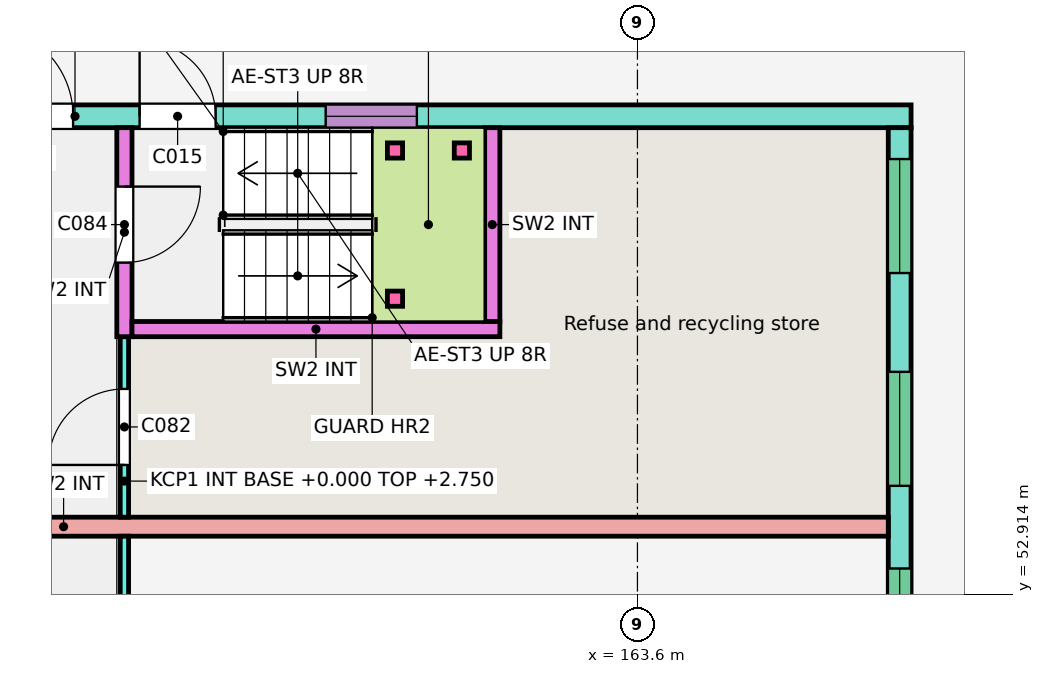
"""IFC4 building model, lengths in metres.
Left out: names, types, materials, properties, quantities, classifications, styles, units other than length and angle.
Written with IfcOpenShell. Run it as: python <this file> out.ifc"""

import sys

from ifc_helpers import new_model, si_unit, direction, frame, frame_2d, origin, origin_2d, place, context, subcontext, project, spatial, rectangle, extrude, element, fill, save


model = new_model("IFC4")
c1 = context("Model", 3, precision=1e-05, world=origin(), true_north=direction((0.0, 1.0)))
c2 = subcontext(c1, "Body", "Model", "MODEL_VIEW")
j1 = project(units=[si_unit("LENGTHUNIT", "METRE"), si_unit("PLANEANGLEUNIT", "RADIAN")], contexts=[c1])
p1 = place(None, origin())
s1 = spatial("IfcSite", under=j1, at=p1, CompositionType="ELEMENT")
p2 = place(p1, origin())
s2 = spatial("IfcBuilding", under=s1, at=p2, CompositionType="ELEMENT")
p3 = place(p2, origin())
s3 = spatial("IfcBuildingStorey", under=s2, at=p3, CompositionType="ELEMENT", Elevation=0.0)
p4 = place(p3, frame((145.2, 59.2, -0.25), z_axis=(0.0, 0.0, 1.0), x_axis=(1.0, 0.0, 0.0)))
e1 = element("IfcWall", 1, at=p4, inside=s3, PredefinedType="SOLIDWALL", context=c2, shape_type="SweptSolid", body=[
    extrude(rectangle(XDim=22.0, YDim=0.3, at=frame_2d((11.0, 0.0))), origin(), (0.0, 0.0, 1.0), 3.25),
])
p5 = place(p4, frame((14.298, 0.0, 1.15)))
e2 = element("IfcOpeningElement", 2, at=p5, cuts=e1, PredefinedType="OPENING", context=c2, shape_type="SweptSolid", body=[
    extrude(rectangle(XDim=1.2, YDim=1.5, at=frame_2d((0.6, 0.75))), frame((0.0, 0.16, 0.0), z_axis=(0.0, -1.0, 0.0), x_axis=(1.0, 0.0, 0.0)), (0.0, 0.0, 1.0), 0.32),
])
p6 = place(p4, frame((9.775, 0.0, 0.25)))
e3 = element("IfcOpeningElement", 3, at=p6, cuts=e1, PredefinedType="OPENING", context=c2, shape_type="SweptSolid", body=[
    extrude(rectangle(XDim=1.2, YDim=2.1, at=frame_2d((0.6, 1.05))), frame((0.0, 0.16, 0.0), z_axis=(0.0, -1.0, 0.0), x_axis=(1.0, 0.0, 0.0)), (0.0, 0.0, 1.0), 0.32),
])
p7 = place(p4, frame((11.85, 0.0, 0.25)))
e4 = element("IfcOpeningElement", 4, at=p7, cuts=e1, PredefinedType="OPENING", context=c2, shape_type="SweptSolid", body=[
    extrude(rectangle(XDim=1.0, YDim=2.1, at=frame_2d((0.5, 1.05))), frame((0.0, 0.16, 0.0), z_axis=(0.0, -1.0, 0.0), x_axis=(1.0, 0.0, 0.0)), (0.0, 0.0, 1.0), 0.32),
])
p8 = place(p3, frame((167.05, 37.75, -0.25), z_axis=(0.0, 0.0, 1.0), x_axis=(0.0, 1.0, 0.0)))
e5 = element("IfcWall", 5, at=p8, inside=s3, PredefinedType="SOLIDWALL", context=c2, shape_type="SweptSolid", body=[
    extrude(rectangle(XDim=21.3, YDim=0.3, at=frame_2d((10.65, 0.0))), origin(), (0.0, 0.0, 1.0), 3.25),
])
p9 = place(p8, frame((0.413, 0.0, 1.15)))
e6 = element("IfcOpeningElement", 6, at=p9, cuts=e5, PredefinedType="OPENING", context=c2, shape_type="SweptSolid", body=[
    extrude(rectangle(XDim=1.5, YDim=1.4, at=frame_2d((0.75, 0.7))), frame((0.0, 0.16, 0.0), z_axis=(0.0, -1.0, 0.0), x_axis=(1.0, 0.0, 0.0)), (0.0, 0.0, 1.0), 0.32),
])
p10 = place(p8, frame((3.212, 0.0, 1.15)))
e7 = element("IfcOpeningElement", 7, at=p10, cuts=e5, PredefinedType="OPENING", context=c2, shape_type="SweptSolid", body=[
    extrude(rectangle(XDim=1.5, YDim=1.4, at=frame_2d((0.75, 0.7))), frame((0.0, 0.16, 0.0), z_axis=(0.0, -1.0, 0.0), x_axis=(1.0, 0.0, 0.0)), (0.0, 0.0, 1.0), 0.32),
])
p11 = place(p8, frame((5.8, 0.0, 1.15)))
e8 = element("IfcOpeningElement", 8, at=p11, cuts=e5, PredefinedType="OPENING", context=c2, shape_type="SweptSolid", body=[
    extrude(rectangle(XDim=1.5, YDim=1.4, at=frame_2d((0.75, 0.7))), frame((0.0, 0.16, 0.0), z_axis=(0.0, -1.0, 0.0), x_axis=(1.0, 0.0, 0.0)), (0.0, 0.0, 1.0), 0.32),
])
p12 = place(p8, frame((8.6, 0.0, 1.15)))
e9 = element("IfcOpeningElement", 9, at=p12, cuts=e5, PredefinedType="OPENING", context=c2, shape_type="SweptSolid", body=[
    extrude(rectangle(XDim=1.5, YDim=1.4, at=frame_2d((0.75, 0.7))), frame((0.0, 0.16, 0.0), z_axis=(0.0, -1.0, 0.0), x_axis=(1.0, 0.0, 0.0)), (0.0, 0.0, 1.0), 0.32),
])
p13 = place(p8, frame((11.2, 0.0, 1.15)))
e10 = element("IfcOpeningElement", 10, at=p13, cuts=e5, PredefinedType="OPENING", context=c2, shape_type="SweptSolid", body=[
    extrude(rectangle(XDim=1.5, YDim=1.4, at=frame_2d((0.75, 0.7))), frame((0.0, 0.16, 0.0), z_axis=(0.0, -1.0, 0.0), x_axis=(1.0, 0.0, 0.0)), (0.0, 0.0, 1.0), 0.32),
])
p14 = place(p8, frame((14.0, 0.0, 1.15)))
e11 = element("IfcOpeningElement", 11, at=p14, cuts=e5, PredefinedType="OPENING", context=c2, shape_type="SweptSolid", body=[
    extrude(rectangle(XDim=1.5, YDim=1.4, at=frame_2d((0.75, 0.7))), frame((0.0, 0.16, 0.0), z_axis=(0.0, -1.0, 0.0), x_axis=(1.0, 0.0, 0.0)), (0.0, 0.0, 1.0), 0.32),
])
p15 = place(p8, frame((16.587, 0.0, 1.15)))
e12 = element("IfcOpeningElement", 12, at=p15, cuts=e5, PredefinedType="OPENING", context=c2, shape_type="SweptSolid", body=[
    extrude(rectangle(XDim=1.5, YDim=1.4, at=frame_2d((0.75, 0.7))), frame((0.0, 0.16, 0.0), z_axis=(0.0, -1.0, 0.0), x_axis=(1.0, 0.0, 0.0)), (0.0, 0.0, 1.0), 0.32),
])
p16 = place(p8, frame((19.387, 0.0, 1.15)))
e13 = element("IfcOpeningElement", 13, at=p16, cuts=e5, PredefinedType="OPENING", context=c2, shape_type="SweptSolid", body=[
    extrude(rectangle(XDim=1.5, YDim=1.4, at=frame_2d((0.75, 0.7))), frame((0.0, 0.16, 0.0), z_axis=(0.0, -1.0, 0.0), x_axis=(1.0, 0.0, 0.0)), (0.0, 0.0, 1.0), 0.32),
])
p17 = place(p3, frame((145.2, 53.8, -0.25), z_axis=(0.0, 0.0, 1.0), x_axis=(1.0, 0.0, 0.0)))
e14 = element("IfcWall", 14, at=p17, inside=s3, PredefinedType="SOLIDWALL", context=c2, shape_type="SweptSolid", body=[
    extrude(rectangle(XDim=21.7, YDim=0.25, at=frame_2d((10.85, 0.0))), origin(), (0.0, 0.0, 1.0), 3.25),
])
for number, where, z_axis, x_axis in (
    (15, (160.41, 56.8, 0.0), (0.0, 0.0, 1.0), (1.0, 0.0, 0.0)),
    (16, (160.41, 58.75, 0.0), (0.0, 0.0, 1.0), (1.0, 0.0, 0.0)),
    (17, (161.29, 58.75, 0.0), (0.0, 0.0, 1.0), (1.0, 0.0, 0.0)),
):
    element("IfcColumn", number, at=place(p3, frame(where, z_axis=z_axis, x_axis=x_axis)), inside=s3, PredefinedType="COLUMN", context=c2, shape_type="SweptSolid", body=[
        extrude(rectangle(XDim=0.2, YDim=0.2, at=origin_2d()), origin(), (0.0, 0.0, 1.0), 1.3),
    ])
p18 = place(p3, frame((156.85, 48.525, 0.0), z_axis=(0.0, 0.0, 1.0), x_axis=(0.0, 1.0, 0.0)))
e18 = element("IfcWall", 18, at=p18, inside=s3, PredefinedType="PARTITIONING", context=c2, shape_type="SweptSolid", body=[
    extrude(rectangle(XDim=5.15, YDim=0.11, at=frame_2d((2.575, 0.0))), origin(), (0.0, 0.0, 1.0), 2.75),
])
p19 = place(p18, frame((2.075, 0.0, 0.0)))
e19 = element("IfcOpeningElement", 19, at=p19, cuts=e18, PredefinedType="OPENING", context=c2, shape_type="SweptSolid", body=[
    extrude(rectangle(XDim=1.0, YDim=2.1, at=frame_2d((0.5, 1.05))), frame((0.0, 0.065, 0.0), z_axis=(0.0, -1.0, 0.0), x_axis=(1.0, 0.0, 0.0)), (0.0, 0.0, 1.0), 0.13),
])
p20 = place(p3, frame((156.85, 53.925, 0.0), z_axis=(0.0, 0.0, 1.0), x_axis=(0.0, 1.0, 0.0)))
e20 = element("IfcWall", 20, at=p20, inside=s3, PredefinedType="PARTITIONING", context=c2, shape_type="SweptSolid", body=[
    extrude(rectangle(XDim=2.375, YDim=0.11, at=frame_2d((1.188, 0.0))), origin(), (0.0, 0.0, 1.0), 2.75),
])
p21 = place(p20, frame((0.688, 0.0, 0.0)))
e21 = element("IfcOpeningElement", 21, at=p21, cuts=e20, PredefinedType="OPENING", context=c2, shape_type="SweptSolid", body=[
    extrude(rectangle(XDim=1.0, YDim=2.1, at=frame_2d((0.5, 1.05))), frame((0.0, 0.065, 0.0), z_axis=(0.0, -1.0, 0.0), x_axis=(1.0, 0.0, 0.0)), (0.0, 0.0, 1.0), 0.13),
])
p22 = place(p3, frame((156.85, 56.3, 0.0), z_axis=(0.0, 0.0, 1.0), x_axis=(0.0, 1.0, 0.0)))
e22 = element("IfcWall", 22, at=p22, inside=s3, PredefinedType="SOLIDWALL", context=c2, shape_type="SweptSolid", body=[
    extrude(rectangle(XDim=2.75, YDim=0.2, at=frame_2d((1.375, 0.0))), origin(), (0.0, 0.0, 1.0), 2.75),
])
p23 = place(p22, frame((0.975, 0.0, 0.0)))
e23 = element("IfcOpeningElement", 23, at=p23, cuts=e22, PredefinedType="OPENING", context=c2, shape_type="SweptSolid", body=[
    extrude(rectangle(XDim=1.0, YDim=2.1, at=frame_2d((0.5, 1.05))), frame((0.0, 0.11, 0.0), z_axis=(0.0, -1.0, 0.0), x_axis=(1.0, 0.0, 0.0)), (0.0, 0.0, 1.0), 0.22),
])
p24 = place(p3, frame((156.95, 56.4, 0.0), z_axis=(0.0, 0.0, 1.0), x_axis=(1.0, 0.0, 0.0)))
e24 = element("IfcWall", 24, at=p24, inside=s3, PredefinedType="SOLIDWALL", context=c2, shape_type="SweptSolid", body=[
    extrude(rectangle(XDim=4.84, YDim=0.2, at=frame_2d((2.42, 0.0))), origin(), (0.0, 0.0, 1.0), 2.75),
])
p25 = place(p3, frame((161.69, 59.05, 0.0), z_axis=(0.0, 0.0, 1.0), x_axis=(0.0, -1.0, 0.0)))
e25 = element("IfcWall", 25, at=p25, inside=s3, PredefinedType="SOLIDWALL", context=c2, shape_type="SweptSolid", body=[
    extrude(rectangle(XDim=2.55, YDim=0.2, at=frame_2d((1.275, 0.0))), origin(), (0.0, 0.0, 1.0), 2.75),
])
p26 = place(p14, origin())
e26 = element("IfcWindow", 26, at=p26, inside=s3, PartitioningType="SINGLE_PANEL", PredefinedType="WINDOW", context=c2, shape_type="SweptSolid", body=[
    extrude(rectangle(XDim=1.5, YDim=1.4, at=frame_2d((0.75, 0.7))), frame((0.0, 0.03, 0.0), z_axis=(0.0, -1.0, 0.0), x_axis=(1.0, 0.0, 0.0)), (0.0, 0.0, 1.0), 0.06),
])
fill(e11, e26)
p27 = place(p15, origin())
e27 = element("IfcWindow", 27, at=p27, inside=s3, PartitioningType="SINGLE_PANEL", PredefinedType="WINDOW", context=c2, shape_type="SweptSolid", body=[
    extrude(rectangle(XDim=1.5, YDim=1.4, at=frame_2d((0.75, 0.7))), frame((0.0, 0.03, 0.0), z_axis=(0.0, -1.0, 0.0), x_axis=(1.0, 0.0, 0.0)), (0.0, 0.0, 1.0), 0.06),
])
fill(e12, e27)
p28 = place(p16, origin())
e28 = element("IfcWindow", 28, at=p28, inside=s3, PartitioningType="SINGLE_PANEL", PredefinedType="WINDOW", context=c2, shape_type="SweptSolid", body=[
    extrude(rectangle(XDim=1.5, YDim=1.4, at=frame_2d((0.75, 0.7))), frame((0.0, 0.03, 0.0), z_axis=(0.0, -1.0, 0.0), x_axis=(1.0, 0.0, 0.0)), (0.0, 0.0, 1.0), 0.06),
])
fill(e13, e28)
p29 = place(p5, origin())
e29 = element("IfcWindow", 29, at=p29, inside=s3, PartitioningType="SINGLE_PANEL", PredefinedType="WINDOW", context=c2, shape_type="SweptSolid", body=[
    extrude(rectangle(XDim=1.2, YDim=1.5, at=frame_2d((0.6, 0.75))), frame((0.0, 0.03, 0.0), z_axis=(0.0, -1.0, 0.0), x_axis=(1.0, 0.0, 0.0)), (0.0, 0.0, 1.0), 0.06),
])
fill(e2, e29)
p30 = place(p6, origin())
e30 = element("IfcDoor", 30, at=p30, inside=s3, OperationType="SINGLE_SWING_LEFT", PredefinedType="DOOR", context=c2, shape_type="SweptSolid", body=[
    extrude(rectangle(XDim=1.2, YDim=2.1, at=frame_2d((0.6, 1.05))), frame((0.0, 0.025, 0.0), z_axis=(0.0, -1.0, 0.0), x_axis=(1.0, 0.0, 0.0)), (0.0, 0.0, 1.0), 0.05),
])
fill(e3, e30)
p31 = place(p7, origin())
e31 = element("IfcDoor", 31, at=p31, inside=s3, OperationType="SINGLE_SWING_LEFT", PredefinedType="DOOR", context=c2, shape_type="SweptSolid", body=[
    extrude(rectangle(XDim=1.0, YDim=2.1, at=frame_2d((0.5, 1.05))), frame((0.0, 0.025, 0.0), z_axis=(0.0, -1.0, 0.0), x_axis=(1.0, 0.0, 0.0)), (0.0, 0.0, 1.0), 0.05),
])
fill(e4, e31)
p32 = place(p21, origin())
e32 = element("IfcDoor", 32, at=p32, inside=s3, OperationType="SINGLE_SWING_LEFT", PredefinedType="DOOR", context=c2, shape_type="SweptSolid", body=[
    extrude(rectangle(XDim=1.0, YDim=2.1, at=frame_2d((0.5, 1.05))), frame((0.0, 0.025, 0.0), z_axis=(0.0, -1.0, 0.0), x_axis=(1.0, 0.0, 0.0)), (0.0, 0.0, 1.0), 0.05),
])
fill(e21, e32)
p33 = place(p23, origin())
e33 = element("IfcDoor", 33, at=p33, inside=s3, OperationType="SINGLE_SWING_RIGHT", PredefinedType="DOOR", context=c2, shape_type="SweptSolid", body=[
    extrude(rectangle(XDim=1.0, YDim=2.1, at=frame_2d((0.5, 1.05))), frame((0.0, 0.025, 0.0), z_axis=(0.0, -1.0, 0.0), x_axis=(1.0, 0.0, 0.0)), (0.0, 0.0, 1.0), 0.05),
])
fill(e23, e33)
save(model, sys.argv[1])
